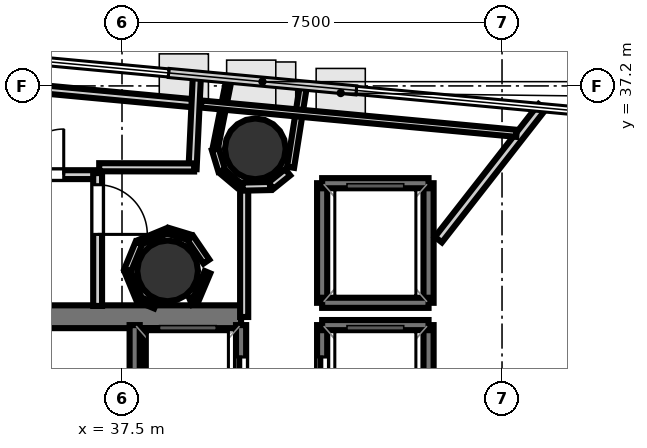
"""IFC4 building model, lengths in metres.
Left out: names, types, materials, properties, quantities, classifications, styles, units other than length and angle.
Written with IfcOpenShell. Run it as: python <this file> out.ifc"""

import sys

from ifc_helpers import new_model, si_unit, direction, frame, frame_2d, origin, origin_2d, place, context, subcontext, project, spatial, rectangle, hollow_circle, extrude, element, fill, save


model = new_model("IFC4")
c1 = context("Model", 3, precision=1e-05, world=origin(), true_north=direction((0.0, 1.0)))
c2 = subcontext(c1, "Body", "Model", "MODEL_VIEW")
j1 = project(units=[si_unit("LENGTHUNIT", "METRE"), si_unit("PLANEANGLEUNIT", "RADIAN")], contexts=[c1])
p1 = place(None, origin())
s1 = spatial("IfcSite", under=j1, at=p1, CompositionType="ELEMENT")
p2 = place(p1, origin())
s2 = spatial("IfcBuilding", under=s1, at=p2, CompositionType="ELEMENT")
p3 = place(p2, frame((0.0, 0.0, 226.2)))
s3 = spatial("IfcBuildingStorey", under=s2, at=p3, CompositionType="ELEMENT", Elevation=226.2)
p4 = place(p3, frame((29.33, 32.645, 0.0), z_axis=(0.0, 0.0, 1.0), x_axis=(1.0, 0.0, 0.0)))
e1 = element("IfcWall", 1, at=p4, inside=s3, PredefinedType="SHEAR", context=c2, shape_type="SweptSolid", body=[
    extrude(rectangle(XDim=10.52, YDim=0.45, at=frame_2d((5.26, 0.0))), origin(), (0.0, 0.0, 1.0), 3.4),
])
p5 = place(p4, frame((0.895, 0.0, 0.0)))
e2 = element("IfcOpeningElement", 2, at=p5, cuts=e1, PredefinedType="OPENING", context=c2, shape_type="SweptSolid", body=[
    extrude(rectangle(XDim=1.25, YDim=2.15, at=frame_2d((0.625, 1.075))), frame((0.0, 0.235, 0.0), z_axis=(0.0, -1.0, 0.0), x_axis=(1.0, 0.0, 0.0)), (0.0, 0.0, 1.0), 0.47),
])
p6 = place(p3, frame((38.18, 24.98, 0.0), z_axis=(0.0, 0.0, 1.0), x_axis=(0.0, 1.0, 0.0)))
e3 = element("IfcWall", 3, at=p6, inside=s3, PredefinedType="SHEAR", context=c2, shape_type="SweptSolid", body=[
    extrude(rectangle(XDim=7.44, YDim=0.45, at=frame_2d((3.72, 0.0))), origin(), (0.0, 0.0, 1.0), 3.4),
])
for number, where, z_axis, x_axis in (
    (4, (38.4, 33.55, 0.0), (0.0, 0.0, 1.0), (1.0, 0.0, 0.0)),
    (5, (40.131, 35.958, 0.0), (0.0, 0.0, 1.0), (1.0, 0.0, 0.0)),
):
    element("IfcColumn", number, at=place(p3, frame(where, z_axis=z_axis, x_axis=x_axis)), inside=s3, PredefinedType="COLUMN", context=c2, shape_type="SweptSolid", body=[
        extrude(hollow_circle(Radius=0.6, WallThickness=0.03, at=origin_2d()), origin(), (0.0, 0.0, 1.0), 3.7),
    ])
p7 = place(p3, frame((39.85, 30.12, 0.0), z_axis=(0.0, 0.0, 1.0), x_axis=(0.0, 1.0, 0.0)))
e6 = element("IfcWall", 6, at=p7, inside=s3, PredefinedType="SOLIDWALL", context=c2, shape_type="SweptSolid", body=[
    extrude(rectangle(XDim=2.36, YDim=0.2, at=frame_2d((1.18, 0.0))), origin(), (0.0, 0.0, 1.0), 3.4),
])
p8 = place(p7, frame((0.63, 0.0, 0.0)))
e7 = element("IfcOpeningElement", 7, at=p8, cuts=e6, PredefinedType="OPENING", context=c2, shape_type="SweptSolid", body=[
    extrude(rectangle(XDim=1.1, YDim=2.15, at=frame_2d((0.55, 1.075))), frame((0.0, 0.11, 0.0), z_axis=(0.0, -1.0, 0.0), x_axis=(1.0, 0.0, 0.0)), (0.0, 0.0, 1.0), 0.22),
])
for number, where, z_axis, x_axis in (
    (8, (37.75, 30.12, 0.0), (0.0, 0.0, 1.0), (0.0, 1.0, 0.0)),
    (9, (43.55, 30.12, 0.0), (0.0, 0.0, 1.0), (0.0, 1.0, 0.0)),
):
    element("IfcWall", number, at=place(p3, frame(where, z_axis=z_axis, x_axis=x_axis)), inside=s3, PredefinedType="SOLIDWALL", context=c2, shape_type="SweptSolid", body=[
        extrude(rectangle(XDim=2.36, YDim=0.2, at=frame_2d((1.18, 0.0))), origin(), (0.0, 0.0, 1.0), 3.4),
    ])
p9 = place(p3, frame((41.45, 30.12, 0.0), z_axis=(0.0, 0.0, 1.0), x_axis=(0.0, 1.0, 0.0)))
e10 = element("IfcWall", 10, at=p9, inside=s3, PredefinedType="SOLIDWALL", context=c2, shape_type="SweptSolid", body=[
    extrude(rectangle(XDim=2.36, YDim=0.2, at=frame_2d((1.18, 0.0))), origin(), (0.0, 0.0, 1.0), 3.4),
])
p10 = place(p9, frame((0.63, 0.0, 0.0)))
e11 = element("IfcOpeningElement", 11, at=p10, cuts=e10, PredefinedType="OPENING", context=c2, shape_type="SweptSolid", body=[
    extrude(rectangle(XDim=1.1, YDim=2.15, at=frame_2d((0.55, 1.075))), frame((0.0, 0.11, 0.0), z_axis=(0.0, -1.0, 0.0), x_axis=(1.0, 0.0, 0.0)), (0.0, 0.0, 1.0), 0.22),
])
p11 = place(p3, frame((41.45, 32.48, 0.0), z_axis=(0.0, 0.0, 1.0), x_axis=(1.0, 0.0, 0.0)))
e12 = element("IfcWall", 12, at=p11, inside=s3, PredefinedType="SOLIDWALL", context=c2, shape_type="SweptSolid", body=[
    extrude(rectangle(XDim=2.1, YDim=0.2, at=frame_2d((1.05, 0.0))), origin(), (0.0, 0.0, 1.0), 3.4),
])
for number, where, z_axis, x_axis in (
    (13, (43.55, 32.92, 0.0), (0.0, 0.0, 1.0), (0.0, 1.0, 0.0)),
    (14, (41.45, 32.92, 0.0), (0.0, 0.0, 1.0), (0.0, 1.0, 0.0)),
):
    element("IfcWall", number, at=place(p3, frame(where, z_axis=z_axis, x_axis=x_axis)), inside=s3, PredefinedType="SOLIDWALL", context=c2, shape_type="SweptSolid", body=[
        extrude(rectangle(XDim=2.36, YDim=0.2, at=frame_2d((1.18, 0.0))), origin(), (0.0, 0.0, 1.0), 3.4),
    ])
for number, where, z_axis, x_axis in (
    (15, (41.45, 35.28, 0.0), (0.0, 0.0, 1.0), (1.0, 0.0, 0.0)),
    (16, (41.45, 32.92, 0.0), (0.0, 0.0, 1.0), (1.0, 0.0, 0.0)),
):
    element("IfcWall", number, at=place(p3, frame(where, z_axis=z_axis, x_axis=x_axis)), inside=s3, PredefinedType="SOLIDWALL", context=c2, shape_type="SweptSolid", body=[
        extrude(rectangle(XDim=2.1, YDim=0.2, at=frame_2d((1.05, 0.0))), origin(), (0.0, 0.0, 1.0), 3.4),
    ])
p12 = place(p3, frame((39.911, 32.64, 0.0), z_axis=(0.0, 0.0, 1.0), x_axis=(0.0, 1.0, 0.0)))
e17 = element("IfcWall", 17, at=p12, inside=s3, PredefinedType="PARTITIONING", context=c2, shape_type="SweptSolid", body=[
    extrude(rectangle(XDim=2.604, YDim=0.16, at=frame_2d((1.302, 0.0))), origin(), (0.0, 0.0, 1.0), 2.72),
])
p13 = place(p3, frame((39.881, 35.213, 0.0), z_axis=(0.0, 0.0, 1.0), x_axis=(0.999756500784, 0.02206669754, 0.0)))
e18 = element("IfcWall", 18, at=p13, inside=s3, PredefinedType="PARTITIONING", context=c2, shape_type="SweptSolid", body=[
    extrude(rectangle(XDim=0.542, YDim=0.16, at=frame_2d((0.271, 0.0))), origin(), (0.0, 0.0, 1.0), 2.72),
])
p14 = place(p3, frame((40.441, 35.232, 0.0), z_axis=(0.0, 0.0, 1.0), x_axis=(0.778714564707, 0.627378376033, 0.0)))
e19 = element("IfcWall", 19, at=p14, inside=s3, PredefinedType="PARTITIONING", context=c2, shape_type="SweptSolid", body=[
    extrude(rectangle(XDim=0.421, YDim=0.16, at=frame_2d((0.21, 0.0))), origin(), (0.0, 0.0, 1.0), 2.72),
])
p15 = place(p3, frame((34.75, 35.449, 0.0), z_axis=(0.0, 0.0, 1.0), x_axis=(1.0, 0.0, 0.0)))
e20 = element("IfcWall", 20, at=p15, inside=s3, PredefinedType="PLUMBINGWALL", context=c2, shape_type="SweptSolid", body=[
    extrude(rectangle(XDim=2.3, YDim=0.175, at=frame_2d((1.15, 0.0))), origin(), (0.0, 0.0, 1.0), 2.72),
])
p16 = place(p15, frame((0.7, 0.0, 0.0)))
e21 = element("IfcOpeningElement", 21, at=p16, cuts=e20, PredefinedType="OPENING", context=c2, shape_type="SweptSolid", body=[
    extrude(rectangle(XDim=0.9, YDim=2.1, at=frame_2d((0.45, 1.05))), frame((0.0, 0.097, 0.0), z_axis=(0.0, -1.0, 0.0), x_axis=(1.0, 0.0, 0.0)), (0.0, 0.0, 1.0), 0.195),
])
p17 = place(p3, frame((37.019, 35.48, 0.0), z_axis=(0.0, 0.0, 1.0), x_axis=(0.0, -1.0, 0.0)))
e22 = element("IfcWall", 22, at=p17, inside=s3, PredefinedType="PLUMBINGWALL", context=c2, shape_type="SweptSolid", body=[
    extrude(rectangle(XDim=2.622, YDim=0.175, at=frame_2d((1.311, 0.0))), origin(), (0.0, 0.0, 1.0), 2.72),
])
p18 = place(p17, frame((0.23, 0.0, 0.0)))
e23 = element("IfcOpeningElement", 23, at=p18, cuts=e22, PredefinedType="OPENING", context=c2, shape_type="SweptSolid", body=[
    extrude(rectangle(XDim=0.98, YDim=2.1, at=frame_2d((0.49, 1.05))), frame((0.0, 0.097, 0.0), z_axis=(0.0, -1.0, 0.0), x_axis=(1.0, 0.0, 0.0)), (0.0, 0.0, 1.0), 0.195),
])
p19 = place(p3, frame((27.151, 37.951, 0.0), z_axis=(0.0, 0.0, 1.0), x_axis=(0.995705004973, -0.092582628349, 0.0)))
e24 = element("IfcWall", 24, at=p19, inside=s3, PredefinedType="PARTITIONING", context=c2, shape_type="SweptSolid", body=[
    extrude(rectangle(XDim=11.882, YDim=0.16, at=frame_2d((5.941, 0.0))), origin(), (0.0, 0.0, 1.0), 2.72),
])
p20 = place(p3, frame((38.979, 37.424, 0.0), z_axis=(0.0, 0.0, 1.0), x_axis=(-0.046339891036, -0.998925730222, 0.0)))
e25 = element("IfcWall", 25, at=p20, inside=s3, PredefinedType="PARTITIONING", context=c2, shape_type="SweptSolid", body=[
    extrude(rectangle(XDim=1.865, YDim=0.16, at=frame_2d((0.933, 0.0))), origin(), (0.0, 0.0, 1.0), 2.72),
])
p21 = place(p3, frame((38.924, 35.591, 0.0), z_axis=(0.0, 0.0, 1.0), x_axis=(-0.999997249133, 0.002345576034, 0.0)))
e26 = element("IfcWall", 26, at=p21, inside=s3, PredefinedType="PARTITIONING", context=c2, shape_type="SweptSolid", body=[
    extrude(rectangle(XDim=1.874, YDim=0.16, at=frame_2d((0.937, 0.0))), origin(), (0.0, 0.0, 1.0), 2.72),
])
p22 = place(p3, frame((43.744, 34.166, 0.0), z_axis=(0.0, 0.0, 1.0), x_axis=(0.615631223484, 0.788034388001, 0.0)))
e27 = element("IfcWall", 27, at=p22, inside=s3, PredefinedType="PLUMBINGWALL", context=c2, shape_type="SweptSolid", body=[
    extrude(rectangle(XDim=3.326, YDim=0.175, at=frame_2d((1.663, 0.0))), origin(), (0.0, 0.0, 1.0), 2.72),
])
p23 = place(p3, frame((40.827, 35.594, 0.0), z_axis=(0.0, 0.0, 1.0), x_axis=(0.155492863566, 0.987837015595, 0.0)))
e28 = element("IfcWall", 28, at=p23, inside=s3, PredefinedType="PARTITIONING", context=c2, shape_type="SweptSolid", body=[
    extrude(rectangle(XDim=1.655, YDim=0.14, at=frame_2d((0.827, 0.0))), origin(), (0.0, 0.0, 1.0), 2.72),
])
p24 = place(p3, frame((39.619, 37.365, 0.0), z_axis=(0.0, 0.0, 1.0), x_axis=(-0.194899506201, -0.980823216733, 0.0)))
e29 = element("IfcWall", 29, at=p24, inside=s3, PredefinedType="PARTITIONING", context=c2, shape_type="SweptSolid", body=[
    extrude(rectangle(XDim=1.428, YDim=0.105, at=frame_2d((0.714, 0.0))), origin(), (0.0, 0.0, 1.0), 2.72),
])
p25 = place(p3, frame((39.341, 35.949, 0.0), z_axis=(0.0, 0.0, 1.0), x_axis=(0.290544943199, -0.956861346268, 0.0)))
e30 = element("IfcWall", 30, at=p25, inside=s3, PredefinedType="PARTITIONING", context=c2, shape_type="SweptSolid", body=[
    extrude(rectangle(XDim=0.441, YDim=0.14, at=frame_2d((0.221, 0.0))), origin(), (0.0, 0.0, 1.0), 2.72),
])
p26 = place(p3, frame((39.479, 35.512, 0.0), z_axis=(0.0, 0.0, 1.0), x_axis=(0.764834909506, -0.644226327622, 0.0)))
e31 = element("IfcWall", 31, at=p26, inside=s3, PredefinedType="PARTITIONING", context=c2, shape_type="SweptSolid", body=[
    extrude(rectangle(XDim=0.415, YDim=0.12, at=frame_2d((0.208, 0.0))), origin(), (0.0, 0.0, 1.0), 2.72),
])
p27 = place(p3, frame((39.166, 33.733, 0.0), z_axis=(0.0, 0.0, 1.0), x_axis=(-0.563162199293, 0.826346378517, 0.0)))
e32 = element("IfcWall", 32, at=p27, inside=s3, PredefinedType="PARTITIONING", context=c2, shape_type="SweptSolid", body=[
    extrude(rectangle(XDim=0.564, YDim=0.14, at=frame_2d((0.282, 0.0))), origin(), (0.0, 0.0, 1.0), 2.72),
])
p28 = place(p3, frame((38.831, 34.212, 0.0), z_axis=(0.0, 0.0, 1.0), x_axis=(-0.957061618741, 0.289884559665, 0.0)))
e33 = element("IfcWall", 33, at=p28, inside=s3, PredefinedType="PARTITIONING", context=c2, shape_type="SweptSolid", body=[
    extrude(rectangle(XDim=0.441, YDim=0.12, at=frame_2d((0.221, 0.0))), origin(), (0.0, 0.0, 1.0), 2.72),
])
p29 = place(p3, frame((38.388, 34.339, 0.0), z_axis=(0.0, 0.0, 1.0), x_axis=(-0.923894108428, -0.382648241093, 0.0)))
e34 = element("IfcWall", 34, at=p29, inside=s3, PredefinedType="PARTITIONING", context=c2, shape_type="SweptSolid", body=[
    extrude(rectangle(XDim=0.582, YDim=0.105, at=frame_2d((0.291, 0.0))), origin(), (0.0, 0.0, 1.0), 2.72),
])
p30 = place(p3, frame((37.834, 34.099, 0.0), z_axis=(0.0, 0.0, 1.0), x_axis=(-0.382796622927, -0.923832639322, 0.0)))
e35 = element("IfcWall", 35, at=p30, inside=s3, PredefinedType="PARTITIONING", context=c2, shape_type="SweptSolid", body=[
    extrude(rectangle(XDim=0.582, YDim=0.14, at=frame_2d((0.291, 0.0))), origin(), (0.0, 0.0, 1.0), 2.72),
])
p31 = place(p3, frame((37.611, 33.538, 0.0), z_axis=(0.0, 0.0, 1.0), x_axis=(0.382796622927, -0.923832639322, 0.0)))
e36 = element("IfcWall", 36, at=p31, inside=s3, PredefinedType="PARTITIONING", context=c2, shape_type="SweptSolid", body=[
    extrude(rectangle(XDim=0.582, YDim=0.12, at=frame_2d((0.291, 0.0))), origin(), (0.0, 0.0, 1.0), 2.72),
])
p32 = place(p3, frame((37.851, 32.984, 0.0), z_axis=(0.0, 0.0, 1.0), x_axis=(0.923908393326, -0.382613748761, 0.0)))
e37 = element("IfcWall", 37, at=p32, inside=s3, PredefinedType="PARTITIONING", context=c2, shape_type="SweptSolid", body=[
    extrude(rectangle(XDim=0.329, YDim=0.105, at=frame_2d((0.165, 0.0))), origin(), (0.0, 0.0, 1.0), 2.72),
])
p33 = place(p3, frame((38.855, 32.945, 0.0), z_axis=(0.0, 0.0, 1.0), x_axis=(0.924628481531, 0.380870281252, 0.0)))
e38 = element("IfcWall", 38, at=p33, inside=s3, PredefinedType="PARTITIONING", context=c2, shape_type="SweptSolid", body=[
    extrude(rectangle(XDim=0.102, YDim=0.14, at=frame_2d((0.051, 0.0))), origin(), (0.0, 0.0, 1.0), 2.72),
])
p34 = place(p3, frame((38.966, 33.0, 0.0), z_axis=(0.0, 0.0, 1.0), x_axis=(0.389247517771, 0.921133198788, 0.0)))
e39 = element("IfcWall", 39, at=p34, inside=s3, PredefinedType="PARTITIONING", context=c2, shape_type="SweptSolid", body=[
    extrude(rectangle(XDim=0.568, YDim=0.12, at=frame_2d((0.284, 0.0))), origin(), (0.0, 0.0, 1.0), 2.72),
])
p35 = place(p3, frame((39.062, 36.843, 0.0), z_axis=(0.0, 0.0, 1.0), x_axis=(0.995704481779, -0.092588255012, 0.0)))
e40 = element("IfcWall", 40, at=p35, inside=s3, PredefinedType="PARTITIONING", context=c2, shape_type="SweptSolid", body=[
    extrude(rectangle(XDim=6.252, YDim=0.14, at=frame_2d((3.126, 0.0))), origin(), (0.0, 0.0, 1.0), 2.72),
])
p36 = place(p8, origin())
e41 = element("IfcDoor", 41, at=p36, inside=s3, OperationType="SLIDING_TO_LEFT", PredefinedType="DOOR", context=c2, shape_type="SweptSolid", body=[
    extrude(rectangle(XDim=1.1, YDim=2.15, at=frame_2d((0.55, 1.075))), frame((0.0, 0.025, 0.0), z_axis=(0.0, -1.0, 0.0), x_axis=(1.0, 0.0, 0.0)), (0.0, 0.0, 1.0), 0.05),
])
fill(e7, e41)
p37 = place(p10, origin())
e42 = element("IfcDoor", 42, at=p37, inside=s3, OperationType="SLIDING_TO_LEFT", PredefinedType="DOOR", context=c2, shape_type="SweptSolid", body=[
    extrude(rectangle(XDim=1.1, YDim=2.15, at=frame_2d((0.55, 1.075))), frame((0.0, 0.025, 0.0), z_axis=(0.0, -1.0, 0.0), x_axis=(1.0, 0.0, 0.0)), (0.0, 0.0, 1.0), 0.05),
])
fill(e11, e42)
p38 = place(p16, origin())
e43 = element("IfcDoor", 43, at=p38, inside=s3, OperationType="SINGLE_SWING_RIGHT", PredefinedType="DOOR", context=c2, shape_type="SweptSolid", body=[
    extrude(rectangle(XDim=0.9, YDim=2.1, at=frame_2d((0.45, 1.05))), frame((0.0, 0.025, 0.0), z_axis=(0.0, -1.0, 0.0), x_axis=(1.0, 0.0, 0.0)), (0.0, 0.0, 1.0), 0.05),
])
fill(e21, e43)
p39 = place(p18, origin())
e44 = element("IfcDoor", 44, at=p39, inside=s3, OperationType="SINGLE_SWING_RIGHT", PredefinedType="DOOR", context=c2, shape_type="SweptSolid", body=[
    extrude(rectangle(XDim=0.98, YDim=2.1, at=frame_2d((0.49, 1.05))), frame((0.0, 0.025, 0.0), z_axis=(0.0, -1.0, 0.0), x_axis=(1.0, 0.0, 0.0)), (0.0, 0.0, 1.0), 0.05),
])
fill(e23, e44)
save(model, sys.argv[1])
